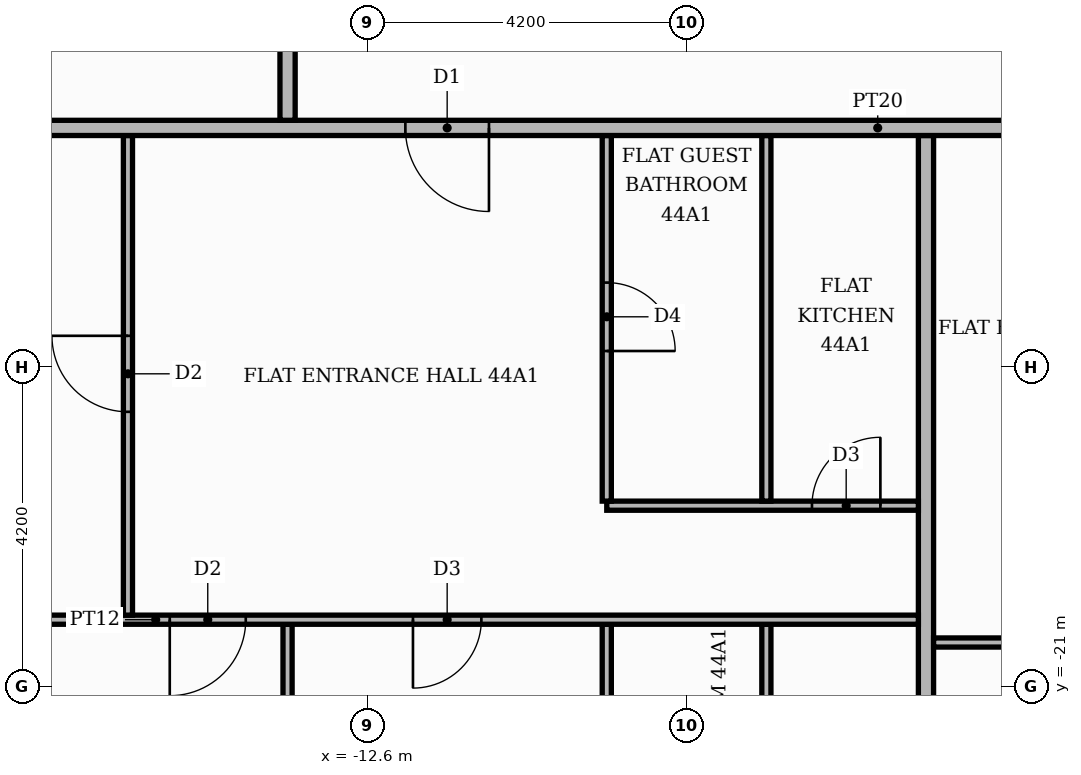
"""IFC4 building model, lengths in metres.
Left out: names, types, materials, properties, quantities, classifications, styles, units other than length and angle.
Written with IfcOpenShell. Run it as: python <this file> out.ifc"""

import sys

from ifc_helpers import new_model, si_unit, direction, frame, frame_2d, origin, place, context, subcontext, project, spatial, rectangle, extrude, element, fill, save


model = new_model("IFC4")
c1 = context("Model", 3, precision=1e-05, world=origin(), true_north=direction((0.0, 1.0)))
c2 = subcontext(c1, "Body", "Model", "MODEL_VIEW")
j1 = project(units=[si_unit("LENGTHUNIT", "METRE"), si_unit("PLANEANGLEUNIT", "RADIAN")], contexts=[c1])
p1 = place(None, origin())
s1 = spatial("IfcSite", under=j1, at=p1, CompositionType="ELEMENT")
p2 = place(p1, origin())
s2 = spatial("IfcBuilding", under=s1, at=p2, CompositionType="ELEMENT")
p3 = place(p2, frame((0.0, 0.0, 188.4)))
s3 = spatial("IfcBuildingStorey", under=s2, at=p3, CompositionType="ELEMENT", Elevation=188.4)
p4 = place(p3, frame((-13.65, -25.42, 0.0), z_axis=(0.0, 0.0, 1.0), x_axis=(0.0, 1.0, 0.0)))
e1 = element("IfcWall", 1, at=p4, inside=s3, PredefinedType="PARTITIONING", context=c2, shape_type="SweptSolid", body=[
    extrude(rectangle(XDim=5.24, YDim=0.12, at=frame_2d((2.62, 0.0))), origin(), (0.0, 0.0, 1.0), 3.48),
])
p5 = place(p3, frame((-9.45, -25.42, 0.0), z_axis=(0.0, 0.0, 1.0), x_axis=(0.0, 1.0, 0.0)))
e2 = element("IfcWall", 2, at=p5, inside=s3, PredefinedType="PARTITIONING", context=c2, shape_type="SweptSolid", body=[
    extrude(rectangle(XDim=5.24, YDim=0.12, at=frame_2d((2.62, 0.0))), origin(), (0.0, 0.0, 1.0), 3.48),
])
p6 = place(p5, frame((2.05, 0.0, 0.0)))
e3 = element("IfcOpeningElement", 3, at=p6, cuts=e2, PredefinedType="OPENING", context=c2, shape_type="SweptSolid", body=[
    extrude(rectangle(XDim=0.9, YDim=2.1, at=frame_2d((0.45, 1.05))), frame((0.0, 0.07, 0.0), z_axis=(0.0, -1.0, 0.0), x_axis=(1.0, 0.0, 0.0)), (0.0, 0.0, 1.0), 0.14),
])
p7 = place(p3, frame((-7.35, -25.42, 0.0), z_axis=(0.0, 0.0, 1.0), x_axis=(0.0, 1.0, 0.0)))
e4 = element("IfcWall", 4, at=p7, inside=s3, PredefinedType="PARTITIONING", context=c2, shape_type="SweptSolid", body=[
    extrude(rectangle(XDim=5.24, YDim=0.12, at=frame_2d((2.62, 0.0))), origin(), (0.0, 0.0, 1.0), 3.48),
])
p8 = place(p7, frame((2.05, 0.0, 0.0)))
e5 = element("IfcOpeningElement", 5, at=p8, cuts=e4, PredefinedType="OPENING", context=c2, shape_type="SweptSolid", body=[
    extrude(rectangle(XDim=0.9, YDim=2.1, at=frame_2d((0.45, 1.05))), frame((0.0, 0.07, 0.0), z_axis=(0.0, -1.0, 0.0), x_axis=(1.0, 0.0, 0.0)), (0.0, 0.0, 1.0), 0.14),
])
p9 = place(p3, frame((-5.25, -25.42, 0.0), z_axis=(0.0, 0.0, 1.0), x_axis=(0.0, 1.0, 0.0)))
e6 = element("IfcWall", 6, at=p9, inside=s3, PredefinedType="PARTITIONING", context=c2, shape_type="SweptSolid", body=[
    extrude(rectangle(XDim=11.67, YDim=0.2, at=frame_2d((5.835, 0.0))), origin(), (0.0, 0.0, 1.0), 3.48),
])
p10 = place(p3, frame((-5.15, -20.42, 0.0), z_axis=(0.0, 0.0, 1.0), x_axis=(1.0, 0.0, 0.0)))
e7 = element("IfcWall", 7, at=p10, inside=s3, PredefinedType="PARTITIONING", context=c2, shape_type="SweptSolid", body=[
    extrude(rectangle(XDim=18.7, YDim=0.12, at=frame_2d((9.35, 0.0))), origin(), (0.0, 0.0, 1.0), 3.48),
])
p11 = place(p10, frame((1.5, 0.0, 0.0)))
e8 = element("IfcOpeningElement", 8, at=p11, cuts=e7, PredefinedType="OPENING", context=c2, shape_type="SweptSolid", body=[
    extrude(rectangle(XDim=1.0, YDim=2.1, at=frame_2d((0.5, 1.05))), frame((0.0, 0.07, 0.0), z_axis=(0.0, -1.0, 0.0), x_axis=(1.0, 0.0, 0.0)), (0.0, 0.0, 1.0), 0.14),
])
p12 = place(p10, frame((5.75, 0.0, 0.0)))
e9 = element("IfcOpeningElement", 9, at=p12, cuts=e7, PredefinedType="OPENING", context=c2, shape_type="SweptSolid", body=[
    extrude(rectangle(XDim=0.9, YDim=2.1, at=frame_2d((0.45, 1.05))), frame((0.0, 0.07, 0.0), z_axis=(0.0, -1.0, 0.0), x_axis=(1.0, 0.0, 0.0)), (0.0, 0.0, 1.0), 0.14),
])
p13 = place(p10, frame((14.15, 0.0, 0.0)))
e10 = element("IfcOpeningElement", 10, at=p13, cuts=e7, PredefinedType="OPENING", context=c2, shape_type="SweptSolid", body=[
    extrude(rectangle(XDim=0.9, YDim=2.1, at=frame_2d((0.45, 1.05))), frame((0.0, 0.07, 0.0), z_axis=(0.0, -1.0, 0.0), x_axis=(1.0, 0.0, 0.0)), (0.0, 0.0, 1.0), 0.14),
])
p14 = place(p3, frame((-25.42, -20.12, 0.0), z_axis=(0.0, 0.0, 1.0), x_axis=(1.0, 0.0, 0.0)))
e11 = element("IfcWall", 11, at=p14, inside=s3, PredefinedType="PARTITIONING", context=c2, shape_type="SweptSolid", body=[
    extrude(rectangle(XDim=20.07, YDim=0.12, at=frame_2d((10.035, 0.0))), origin(), (0.0, 0.0, 1.0), 3.48),
])
p15 = place(p14, frame((10.22, 0.0, 0.0)))
e12 = element("IfcOpeningElement", 12, at=p15, cuts=e11, PredefinedType="OPENING", context=c2, shape_type="SweptSolid", body=[
    extrude(rectangle(XDim=1.0, YDim=2.1, at=frame_2d((0.5, 1.05))), frame((0.0, 0.07, 0.0), z_axis=(0.0, -1.0, 0.0), x_axis=(1.0, 0.0, 0.0)), (0.0, 0.0, 1.0), 0.14),
])
p16 = place(p14, frame((13.42, 0.0, 0.0)))
e13 = element("IfcOpeningElement", 13, at=p16, cuts=e11, PredefinedType="OPENING", context=c2, shape_type="SweptSolid", body=[
    extrude(rectangle(XDim=0.9, YDim=2.1, at=frame_2d((0.45, 1.05))), frame((0.0, 0.07, 0.0), z_axis=(0.0, -1.0, 0.0), x_axis=(1.0, 0.0, 0.0)), (0.0, 0.0, 1.0), 0.14),
])
p17 = place(p3, frame((-15.75, -20.06, 0.0), z_axis=(0.0, 0.0, 1.0), x_axis=(0.0, 1.0, 0.0)))
e14 = element("IfcWall", 14, at=p17, inside=s3, PredefinedType="PARTITIONING", context=c2, shape_type="SweptSolid", body=[
    extrude(rectangle(XDim=6.31, YDim=0.12, at=frame_2d((3.155, 0.0))), origin(), (0.0, 0.0, 1.0), 3.48),
])
p18 = place(p17, frame((2.675, 0.0, 0.0)))
e15 = element("IfcOpeningElement", 15, at=p18, cuts=e14, PredefinedType="OPENING", context=c2, shape_type="SweptSolid", body=[
    extrude(rectangle(XDim=1.0, YDim=2.1, at=frame_2d((0.5, 1.05))), frame((0.0, 0.07, 0.0), z_axis=(0.0, -1.0, 0.0), x_axis=(1.0, 0.0, 0.0)), (0.0, 0.0, 1.0), 0.14),
])
p19 = place(p3, frame((-9.45, -18.62, 0.0), z_axis=(0.0, 0.0, 1.0), x_axis=(1.0, 0.0, 0.0)))
e16 = element("IfcWall", 16, at=p19, inside=s3, PredefinedType="PARTITIONING", context=c2, shape_type="SweptSolid", body=[
    extrude(rectangle(XDim=4.1, YDim=0.12, at=frame_2d((2.05, 0.0))), origin(), (0.0, 0.0, 1.0), 3.48),
])
p20 = place(p19, frame((2.7, 0.0, 0.0)))
e17 = element("IfcOpeningElement", 17, at=p20, cuts=e16, PredefinedType="OPENING", context=c2, shape_type="SweptSolid", body=[
    extrude(rectangle(XDim=0.9, YDim=2.1, at=frame_2d((0.45, 1.05))), frame((0.0, 0.07, 0.0), z_axis=(0.0, -1.0, 0.0), x_axis=(1.0, 0.0, 0.0)), (0.0, 0.0, 1.0), 0.14),
])
p21 = place(p3, frame((-9.45, -18.56, 0.0), z_axis=(0.0, 0.0, 1.0), x_axis=(0.0, 1.0, 0.0)))
e18 = element("IfcWall", 18, at=p21, inside=s3, PredefinedType="PARTITIONING", context=c2, shape_type="SweptSolid", body=[
    extrude(rectangle(XDim=4.81, YDim=0.12, at=frame_2d((2.405, 0.0))), origin(), (0.0, 0.0, 1.0), 3.48),
])
p22 = place(p21, frame((1.975, 0.0, 0.0)))
e19 = element("IfcOpeningElement", 19, at=p22, cuts=e18, PredefinedType="OPENING", context=c2, shape_type="SweptSolid", body=[
    extrude(rectangle(XDim=0.9, YDim=2.1, at=frame_2d((0.45, 1.05))), frame((0.0, 0.07, 0.0), z_axis=(0.0, -1.0, 0.0), x_axis=(1.0, 0.0, 0.0)), (0.0, 0.0, 1.0), 0.14),
])
p23 = place(p3, frame((-7.35, -18.56, 0.0), z_axis=(0.0, 0.0, 1.0), x_axis=(0.0, 1.0, 0.0)))
e20 = element("IfcWall", 20, at=p23, inside=s3, PredefinedType="PARTITIONING", context=c2, shape_type="SweptSolid", body=[
    extrude(rectangle(XDim=4.81, YDim=0.12, at=frame_2d((2.405, 0.0))), origin(), (0.0, 0.0, 1.0), 3.48),
])
p24 = place(p3, frame((-25.42, -13.65, 0.0), z_axis=(0.0, 0.0, 1.0), x_axis=(1.0, 0.0, 0.0)))
e21 = element("IfcWall", 21, at=p24, inside=s3, PredefinedType="PARTITIONING", context=c2, shape_type="SweptSolid", body=[
    extrude(rectangle(XDim=39.07, YDim=0.2, at=frame_2d((19.535, 0.0))), origin(), (0.0, 0.0, 1.0), 3.48),
])
p25 = place(p24, frame((13.32, 0.0, 0.0)))
e22 = element("IfcOpeningElement", 22, at=p25, cuts=e21, PredefinedType="OPENING", context=c2, shape_type="SweptSolid", body=[
    extrude(rectangle(XDim=1.1, YDim=2.4, at=frame_2d((0.55, 1.2))), frame((0.0, 0.11, 0.0), z_axis=(0.0, -1.0, 0.0), x_axis=(1.0, 0.0, 0.0)), (0.0, 0.0, 1.0), 0.22),
])
p26 = place(p24, frame((21.72, 0.0, 0.0)))
e23 = element("IfcOpeningElement", 23, at=p26, cuts=e21, PredefinedType="OPENING", context=c2, shape_type="SweptSolid", body=[
    extrude(rectangle(XDim=1.1, YDim=2.4, at=frame_2d((0.55, 1.2))), frame((0.0, 0.11, 0.0), z_axis=(0.0, -1.0, 0.0), x_axis=(1.0, 0.0, 0.0)), (0.0, 0.0, 1.0), 0.22),
])
p27 = place(p3, frame((-13.65, -13.55, 0.0), z_axis=(0.0, 0.0, 1.0), x_axis=(0.0, 1.0, 0.0)))
e24 = element("IfcWall", 24, at=p27, inside=s3, PredefinedType="PARTITIONING", context=c2, shape_type="SweptSolid", body=[
    extrude(rectangle(XDim=18.7, YDim=0.2, at=frame_2d((9.35, 0.0))), origin(), (0.0, 0.0, 1.0), 3.48),
])
p28 = place(p27, frame((14.05, 0.0, 0.0)))
e25 = element("IfcOpeningElement", 25, at=p28, cuts=e24, PredefinedType="OPENING", context=c2, shape_type="SweptSolid", body=[
    extrude(rectangle(XDim=1.1, YDim=2.4, at=frame_2d((0.55, 1.2))), frame((0.0, 0.11, 0.0), z_axis=(0.0, -1.0, 0.0), x_axis=(1.0, 0.0, 0.0)), (0.0, 0.0, 1.0), 0.22),
])
p29 = place(p25, frame((1.1, 0.0, 0.0), z_axis=(0.0, 0.0, 1.0), x_axis=(-1.0, 0.0, 0.0)))
e26 = element("IfcDoor", 26, at=p29, inside=s3, OperationType="SINGLE_SWING_RIGHT", PredefinedType="DOOR", context=c2, shape_type="SweptSolid", body=[
    extrude(rectangle(XDim=1.1, YDim=2.4, at=frame_2d((0.55, 1.2))), frame((0.0, 0.025, 0.0), z_axis=(0.0, -1.0, 0.0), x_axis=(1.0, 0.0, 0.0)), (0.0, 0.0, 1.0), 0.05),
])
fill(e22, e26)
p30 = place(p18, origin())
e27 = element("IfcDoor", 27, at=p30, inside=s3, OperationType="SINGLE_SWING_RIGHT", PredefinedType="DOOR", context=c2, shape_type="SweptSolid", body=[
    extrude(rectangle(XDim=1.0, YDim=2.1, at=frame_2d((0.5, 1.05))), frame((0.0, 0.025, 0.0), z_axis=(0.0, -1.0, 0.0), x_axis=(1.0, 0.0, 0.0)), (0.0, 0.0, 1.0), 0.05),
])
fill(e15, e27)
p31 = place(p22, frame((0.9, 0.0, 0.0), z_axis=(0.0, 0.0, 1.0), x_axis=(-1.0, 0.0, 0.0)))
e28 = element("IfcDoor", 28, at=p31, inside=s3, OperationType="SINGLE_SWING_LEFT", PredefinedType="DOOR", context=c2, shape_type="SweptSolid", body=[
    extrude(rectangle(XDim=0.9, YDim=2.1, at=frame_2d((0.45, 1.05))), frame((0.0, 0.025, 0.0), z_axis=(0.0, -1.0, 0.0), x_axis=(1.0, 0.0, 0.0)), (0.0, 0.0, 1.0), 0.05),
])
fill(e19, e28)
p32 = place(p20, origin())
e29 = element("IfcDoor", 29, at=p32, inside=s3, OperationType="SINGLE_SWING_RIGHT", PredefinedType="DOOR", context=c2, shape_type="SweptSolid", body=[
    extrude(rectangle(XDim=0.9, YDim=2.1, at=frame_2d((0.45, 1.05))), frame((0.0, 0.025, 0.0), z_axis=(0.0, -1.0, 0.0), x_axis=(1.0, 0.0, 0.0)), (0.0, 0.0, 1.0), 0.05),
])
fill(e17, e29)
p33 = place(p15, frame((1.0, 0.0, 0.0), z_axis=(0.0, 0.0, 1.0), x_axis=(-1.0, 0.0, 0.0)))
e30 = element("IfcDoor", 30, at=p33, inside=s3, OperationType="SINGLE_SWING_LEFT", PredefinedType="DOOR", context=c2, shape_type="SweptSolid", body=[
    extrude(rectangle(XDim=1.0, YDim=2.1, at=frame_2d((0.5, 1.05))), frame((0.0, 0.025, 0.0), z_axis=(0.0, -1.0, 0.0), x_axis=(1.0, 0.0, 0.0)), (0.0, 0.0, 1.0), 0.05),
])
fill(e12, e30)
p34 = place(p16, frame((0.9, 0.0, 0.0), z_axis=(0.0, 0.0, 1.0), x_axis=(-1.0, 0.0, 0.0)))
e31 = element("IfcDoor", 31, at=p34, inside=s3, OperationType="SINGLE_SWING_LEFT", PredefinedType="DOOR", context=c2, shape_type="SweptSolid", body=[
    extrude(rectangle(XDim=0.9, YDim=2.1, at=frame_2d((0.45, 1.05))), frame((0.0, 0.025, 0.0), z_axis=(0.0, -1.0, 0.0), x_axis=(1.0, 0.0, 0.0)), (0.0, 0.0, 1.0), 0.05),
])
fill(e13, e31)
save(model, sys.argv[1])
